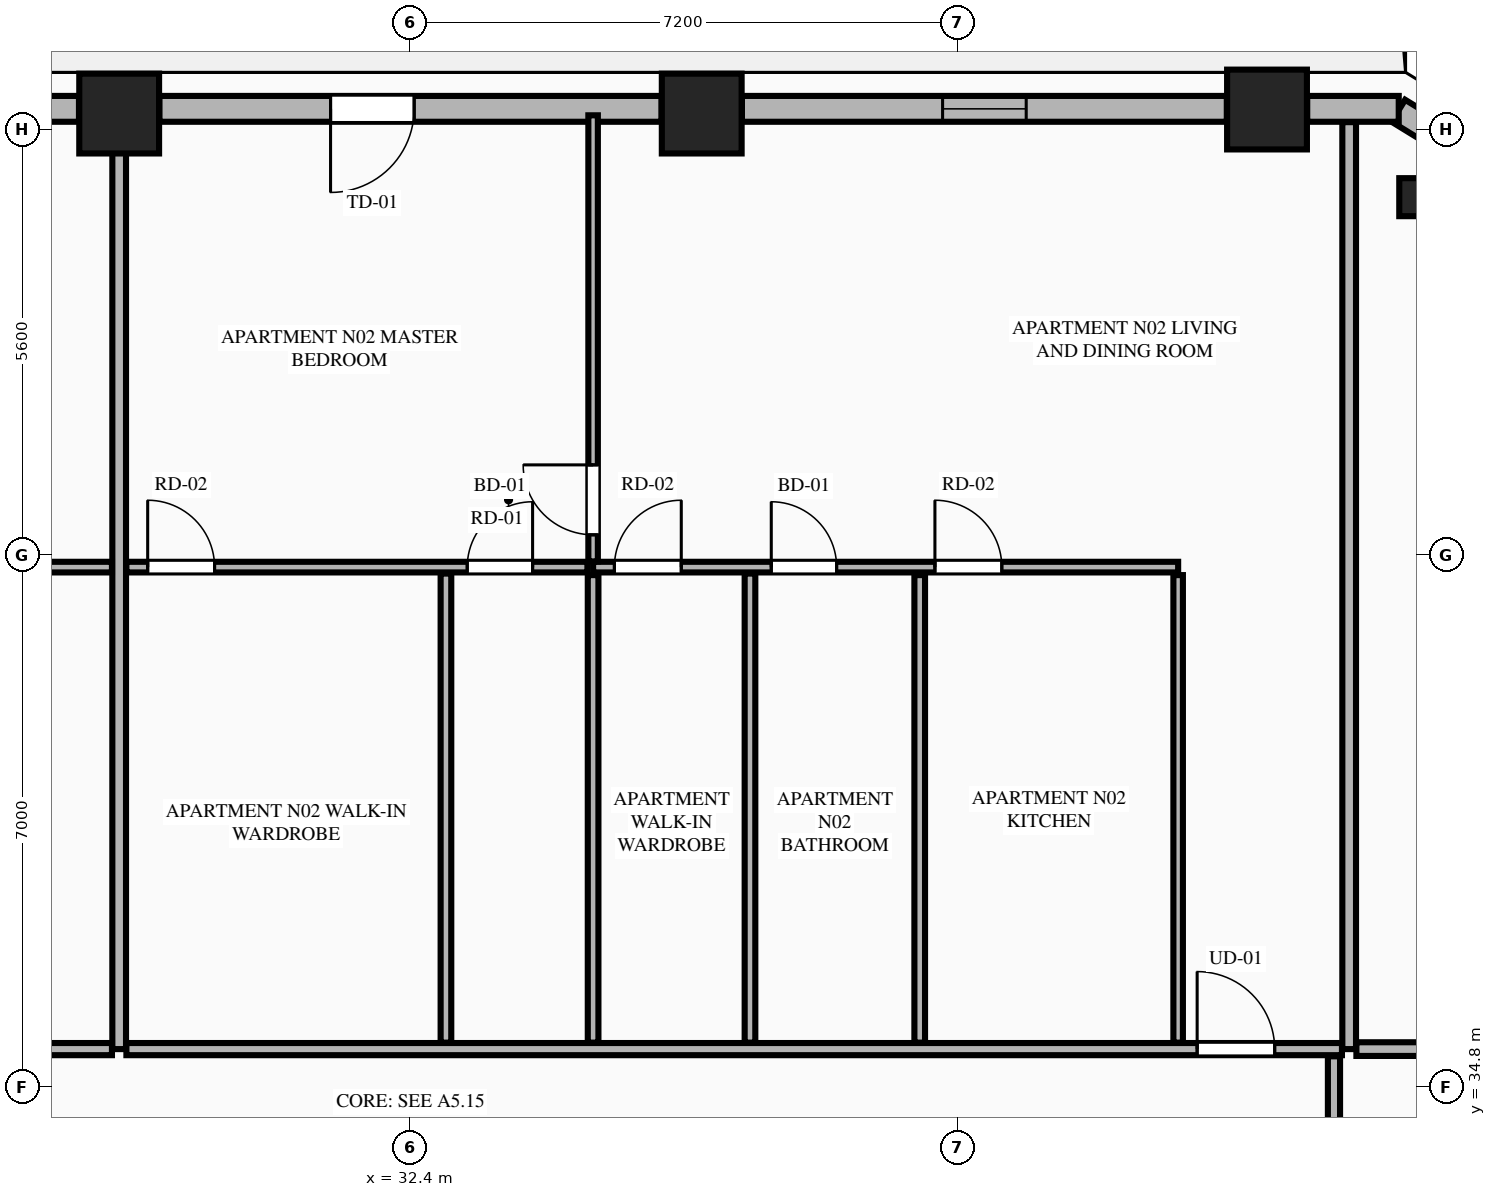
"""IFC4 building model, lengths in metres.
Left out: names, types, materials, properties, quantities, classifications, styles, units other than length and angle.
Written with IfcOpenShell. Run it as: python <this file> out.ifc"""

import sys

from ifc_helpers import new_model, si_unit, direction, frame, frame_2d, origin, origin_2d, place, context, subcontext, project, spatial, rectangle, extrude, element, fill, save


model = new_model("IFC4")
c1 = context("Model", 3, precision=1e-05, world=origin(), true_north=direction((0.0, 1.0)))
c2 = subcontext(c1, "Body", "Model", "MODEL_VIEW")
j1 = project(units=[si_unit("LENGTHUNIT", "METRE"), si_unit("PLANEANGLEUNIT", "RADIAN")], contexts=[c1])
p1 = place(None, origin())
s1 = spatial("IfcSite", under=j1, at=p1, CompositionType="ELEMENT")
p2 = place(p1, origin())
s2 = spatial("IfcBuilding", under=s1, at=p2, CompositionType="ELEMENT")
p3 = place(p2, frame((0.0, 0.0, 137.45)))
s3 = spatial("IfcBuildingStorey", under=s2, at=p3, CompositionType="ELEMENT", Elevation=137.45)
for number, where, z_axis, x_axis in (
    (1, (43.669, 47.661, 0.0), (0.0, 0.0, 1.0), (1.0, 0.0, 0.0)),
    (2, (36.232, 47.608, 0.0), (0.0, 0.0, 1.0), (1.0, 0.0, 0.0)),
    (3, (28.568, 47.608, 0.0), (0.0, 0.0, 1.0), (1.0, 0.0, 0.0)),
):
    element("IfcColumn", number, at=place(p3, frame(where, z_axis=z_axis, x_axis=x_axis)), inside=s3, PredefinedType="COLUMN", context=c2, shape_type="SweptSolid", body=[
        extrude(rectangle(XDim=1.05, YDim=1.05, at=origin_2d()), origin(), (0.0, 0.0, 1.0), 3.55),
    ])
p4 = place(p3, frame((45.659, 46.508, 0.0), z_axis=(0.0, 0.0, 1.0), x_axis=(-0.865160173452, 0.501495637342, 0.0)))
e4 = element("IfcColumn", 4, at=p4, inside=s3, PredefinedType="PILASTER", context=c2, shape_type="SweptSolid", body=[
    extrude(rectangle(XDim=0.5, YDim=0.35, at=origin_2d()), origin(), (0.0, 0.0, 1.0), 3.55),
])
p5 = place(p3, frame((46.971, 46.677, 0.0), z_axis=(0.0, 0.0, 1.0), x_axis=(-0.851798915137, 0.523868884523, 0.0)))
e5 = element("IfcWall", 5, at=p5, inside=s3, PredefinedType="STANDARD", context=c2, shape_type="SweptSolid", body=[
    extrude(rectangle(XDim=1.848, YDim=0.34, at=frame_2d((0.924, 0.0))), origin(), (0.0, 0.0, 1.0), 3.34),
])
p6 = place(p3, frame((45.402, 47.67, 0.0), z_axis=(0.0, 0.0, 1.0), x_axis=(-1.0, 0.0, 0.0)))
e6 = element("IfcWall", 6, at=p6, inside=s3, PredefinedType="STANDARD", context=c2, shape_type="SweptSolid", body=[
    extrude(rectangle(XDim=1.204, YDim=0.34, at=frame_2d((0.602, 0.0))), origin(), (0.0, 0.0, 1.0), 3.34),
])
p7 = place(p3, frame((43.14, 47.67, 0.0), z_axis=(0.0, 0.0, 1.0), x_axis=(-1.0, 0.0, 0.0)))
e7 = element("IfcWall", 7, at=p7, inside=s3, PredefinedType="STANDARD", context=c2, shape_type="SweptSolid", body=[
    extrude(rectangle(XDim=6.379, YDim=0.34, at=frame_2d((3.189, 0.0))), origin(), (0.0, 0.0, 1.0), 2.797),
])
p8 = place(p7, frame((2.639, 0.0, 0.75)))
e8 = element("IfcOpeningElement", 8, at=p8, cuts=e7, PredefinedType="OPENING", context=c2, shape_type="SweptSolid", body=[
    extrude(rectangle(XDim=1.1, YDim=1.897, at=frame_2d((0.55, 0.948))), frame((0.0, 0.18, 0.0), z_axis=(0.0, -1.0, 0.0), x_axis=(1.0, 0.0, 0.0)), (0.0, 0.0, 1.0), 0.36),
])
p9 = place(p3, frame((35.703, 47.67, 0.0), z_axis=(0.0, 0.0, 1.0), x_axis=(-1.0, 0.0, 0.0)))
e9 = element("IfcWall", 9, at=p9, inside=s3, PredefinedType="STANDARD", context=c2, shape_type="SweptSolid", body=[
    extrude(rectangle(XDim=6.606, YDim=0.34, at=frame_2d((3.303, 0.0))), origin(), (0.0, 0.0, 1.0), 2.797),
])
p10 = place(p9, frame((3.254, 0.0, 0.0)))
e10 = element("IfcOpeningElement", 10, at=p10, cuts=e9, PredefinedType="OPENING", context=c2, shape_type="SweptSolid", body=[
    extrude(rectangle(XDim=1.1, YDim=2.25, at=frame_2d((0.55, 1.125))), frame((0.0, 0.18, 0.0), z_axis=(0.0, -1.0, 0.0), x_axis=(1.0, 0.0, 0.0)), (0.0, 0.0, 1.0), 0.36),
])
p11 = place(p3, frame((28.039, 47.67, 0.0), z_axis=(0.0, 0.0, 1.0), x_axis=(-1.0, 0.0, 0.0)))
e11 = element("IfcWall", 11, at=p11, inside=s3, PredefinedType="STANDARD", context=c2, shape_type="SweptSolid", body=[
    extrude(rectangle(XDim=6.379, YDim=0.34, at=frame_2d((3.189, 0.0))), origin(), (0.0, 0.0, 1.0), 2.797),
])
p12 = place(p11, frame((2.64, 0.0, 0.75)))
e12 = element("IfcOpeningElement", 12, at=p12, cuts=e11, PredefinedType="OPENING", context=c2, shape_type="SweptSolid", body=[
    extrude(rectangle(XDim=1.1, YDim=1.897, at=frame_2d((0.55, 0.948))), frame((0.0, 0.18, 0.0), z_axis=(0.0, -1.0, 0.0), x_axis=(1.0, 0.0, 0.0)), (0.0, 0.0, 1.0), 0.36),
])
p13 = place(p3, frame((28.568, 35.3, 0.0), z_axis=(0.0, 0.0, 1.0), x_axis=(0.0, 1.0, 0.0)))
e13 = element("IfcWall", 13, at=p13, inside=s3, PredefinedType="PARTITIONING", context=c2, shape_type="SweptSolid", body=[
    extrude(rectangle(XDim=12.195, YDim=0.18, at=frame_2d((6.098, 0.0))), origin(), (0.0, 0.0, 1.0), 2.722),
])
p14 = place(p3, frame((44.75, 35.3, 0.0), z_axis=(0.0, 0.0, 1.0), x_axis=(0.0, 1.0, 0.0)))
e14 = element("IfcWall", 14, at=p14, inside=s3, PredefinedType="PARTITIONING", context=c2, shape_type="SweptSolid", body=[
    extrude(rectangle(XDim=12.195, YDim=0.18, at=frame_2d((6.098, 0.0))), origin(), (0.0, 0.0, 1.0), 3.34),
])
p15 = place(p3, frame((20.145, 35.3, 0.0), z_axis=(0.0, 0.0, 1.0), x_axis=(1.0, 0.0, 0.0)))
e15 = element("IfcWall", 15, at=p15, inside=s3, PredefinedType="PARTITIONING", context=c2, shape_type="SweptSolid", body=[
    extrude(rectangle(XDim=8.328, YDim=0.16, at=frame_2d((4.164, 0.0))), origin(), (0.0, 0.0, 1.0), 3.34),
])
p16 = place(p15, frame((0.405, 0.0, 0.0)))
e16 = element("IfcOpeningElement", 16, at=p16, cuts=e15, PredefinedType="OPENING", context=c2, shape_type="SweptSolid", body=[
    extrude(rectangle(XDim=1.02, YDim=2.25, at=frame_2d((0.51, 1.125))), frame((0.0, 0.09, 0.0), z_axis=(0.0, -1.0, 0.0), x_axis=(1.0, 0.0, 0.0)), (0.0, 0.0, 1.0), 0.18),
])
p17 = place(p3, frame((22.1, 41.641, 0.0), z_axis=(0.0, 0.0, 1.0), x_axis=(1.0, 0.0, 0.0)))
e17 = element("IfcWall", 17, at=p17, inside=s3, PredefinedType="PLUMBINGWALL", context=c2, shape_type="SweptSolid", body=[
    extrude(rectangle(XDim=6.373, YDim=0.14, at=frame_2d((3.187, 0.0))), origin(), (0.0, 0.0, 1.0), 3.34),
])
p18 = place(p17, frame((4.314, 0.0, 0.0)))
e18 = element("IfcOpeningElement", 18, at=p18, cuts=e17, PredefinedType="OPENING", context=c2, shape_type="SweptSolid", body=[
    extrude(rectangle(XDim=0.86, YDim=2.1, at=frame_2d((0.43, 1.05))), frame((0.0, 0.08, 0.0), z_axis=(0.0, -1.0, 0.0), x_axis=(1.0, 0.0, 0.0)), (0.0, 0.0, 1.0), 0.16),
])
p19 = place(p17, frame((0.22, 0.0, 0.0)))
e19 = element("IfcOpeningElement", 19, at=p19, cuts=e17, PredefinedType="OPENING", context=c2, shape_type="SweptSolid", body=[
    extrude(rectangle(XDim=0.88, YDim=2.15, at=frame_2d((0.44, 1.075))), frame((0.0, 0.08, 0.0), z_axis=(0.0, -1.0, 0.0), x_axis=(1.0, 0.0, 0.0)), (0.0, 0.0, 1.0), 0.16),
])
p20 = place(p3, frame((28.663, 35.3, 0.0), z_axis=(0.0, 0.0, 1.0), x_axis=(1.0, 0.0, 0.0)))
e20 = element("IfcWall", 20, at=p20, inside=s3, PredefinedType="PARTITIONING", context=c2, shape_type="SweptSolid", body=[
    extrude(rectangle(XDim=15.992, YDim=0.16, at=frame_2d((7.996, 0.0))), origin(), (0.0, 0.0, 1.0), 3.34),
])
p21 = place(p20, frame((14.087, 0.0, 0.0)))
e21 = element("IfcOpeningElement", 21, at=p21, cuts=e20, PredefinedType="OPENING", context=c2, shape_type="SweptSolid", body=[
    extrude(rectangle(XDim=1.02, YDim=2.25, at=frame_2d((0.51, 1.125))), frame((0.0, 0.09, 0.0), z_axis=(0.0, -1.0, 0.0), x_axis=(1.0, 0.0, 0.0)), (0.0, 0.0, 1.0), 0.18),
])
p22 = place(p3, frame((42.5, 35.385, 0.0), z_axis=(0.0, 0.0, 1.0), x_axis=(0.0, 1.0, 0.0)))
e22 = element("IfcWall", 22, at=p22, inside=s3, PredefinedType="PARTITIONING", context=c2, shape_type="SweptSolid", body=[
    extrude(rectangle(XDim=6.151, YDim=0.125, at=frame_2d((3.075, 0.0))), origin(), (0.0, 0.0, 1.0), 2.722),
])
p23 = place(p3, frame((34.803, 41.641, 0.0), z_axis=(0.0, 0.0, 1.0), x_axis=(1.0, 0.0, 0.0)))
e23 = element("IfcWall", 23, at=p23, inside=s3, PredefinedType="PLUMBINGWALL", context=c2, shape_type="SweptSolid", body=[
    extrude(rectangle(XDim=7.697, YDim=0.14, at=frame_2d((3.849, 0.0))), origin(), (0.0, 0.0, 1.0), 3.34),
])
p24 = place(p23, frame((0.28, 0.0, 0.0)))
e24 = element("IfcOpeningElement", 24, at=p24, cuts=e23, PredefinedType="OPENING", context=c2, shape_type="SweptSolid", body=[
    extrude(rectangle(XDim=0.88, YDim=2.15, at=frame_2d((0.44, 1.075))), frame((0.0, 0.08, 0.0), z_axis=(0.0, -1.0, 0.0), x_axis=(1.0, 0.0, 0.0)), (0.0, 0.0, 1.0), 0.16),
])
p25 = place(p23, frame((2.344, 0.0, 0.0)))
e25 = element("IfcOpeningElement", 25, at=p25, cuts=e23, PredefinedType="OPENING", context=c2, shape_type="SweptSolid", body=[
    extrude(rectangle(XDim=0.86, YDim=2.1, at=frame_2d((0.43, 1.05))), frame((0.0, 0.08, 0.0), z_axis=(0.0, -1.0, 0.0), x_axis=(1.0, 0.0, 0.0)), (0.0, 0.0, 1.0), 0.16),
])
p26 = place(p23, frame((4.497, 0.0, 0.0)))
e26 = element("IfcOpeningElement", 26, at=p26, cuts=e23, PredefinedType="OPENING", context=c2, shape_type="SweptSolid", body=[
    extrude(rectangle(XDim=0.88, YDim=2.15, at=frame_2d((0.44, 1.075))), frame((0.0, 0.08, 0.0), z_axis=(0.0, -1.0, 0.0), x_axis=(1.0, 0.0, 0.0)), (0.0, 0.0, 1.0), 0.16),
])
p27 = place(p3, frame((28.663, 41.641, 0.0), z_axis=(0.0, 0.0, 1.0), x_axis=(1.0, 0.0, 0.0)))
e27 = element("IfcWall", 27, at=p27, inside=s3, PredefinedType="PLUMBINGWALL", context=c2, shape_type="SweptSolid", body=[
    extrude(rectangle(XDim=6.065, YDim=0.14, at=frame_2d((3.032, 0.0))), origin(), (0.0, 0.0, 1.0), 3.34),
])
p28 = place(p27, frame((0.28, 0.0, 0.0)))
e28 = element("IfcOpeningElement", 28, at=p28, cuts=e27, PredefinedType="OPENING", context=c2, shape_type="SweptSolid", body=[
    extrude(rectangle(XDim=0.88, YDim=2.15, at=frame_2d((0.44, 1.075))), frame((0.0, 0.08, 0.0), z_axis=(0.0, -1.0, 0.0), x_axis=(1.0, 0.0, 0.0)), (0.0, 0.0, 1.0), 0.16),
])
p29 = place(p27, frame((4.484, 0.0, 0.0)))
e29 = element("IfcOpeningElement", 29, at=p29, cuts=e27, PredefinedType="OPENING", context=c2, shape_type="SweptSolid", body=[
    extrude(rectangle(XDim=0.86, YDim=2.1, at=frame_2d((0.43, 1.05))), frame((0.0, 0.08, 0.0), z_axis=(0.0, -1.0, 0.0), x_axis=(1.0, 0.0, 0.0)), (0.0, 0.0, 1.0), 0.16),
])
for number, where, z_axis, x_axis in (
    (30, (39.1, 35.385, 0.0), (0.0, 0.0, 1.0), (0.0, 1.0, 0.0)),
    (31, (34.803, 35.385, 0.0), (0.0, 0.0, 1.0), (0.0, 1.0, 0.0)),
):
    element("IfcWall", number, at=place(p3, frame(where, z_axis=z_axis, x_axis=x_axis)), inside=s3, PredefinedType="PLUMBINGWALL", context=c2, shape_type="SweptSolid", body=[
        extrude(rectangle(XDim=6.151, YDim=0.14, at=frame_2d((3.075, 0.0))), origin(), (0.0, 0.0, 1.0), 3.34),
    ])
p30 = place(p3, frame((34.803, 41.716, 0.0), z_axis=(0.0, 0.0, 1.0), x_axis=(0.0, 1.0, 0.0)))
e32 = element("IfcWall", 32, at=p30, inside=s3, PredefinedType="PARTITIONING", context=c2, shape_type="SweptSolid", body=[
    extrude(rectangle(XDim=5.869, YDim=0.125, at=frame_2d((2.935, 0.0))), origin(), (0.0, 0.0, 1.0), 3.34),
])
p31 = place(p30, frame((0.35, 0.0, 0.0)))
e33 = element("IfcOpeningElement", 33, at=p31, cuts=e32, PredefinedType="OPENING", context=c2, shape_type="SweptSolid", body=[
    extrude(rectangle(XDim=0.92, YDim=2.15, at=frame_2d((0.46, 1.075))), frame((0.0, 0.073, 0.0), z_axis=(0.0, -1.0, 0.0), x_axis=(1.0, 0.0, 0.0)), (0.0, 0.0, 1.0), 0.145),
])
for number, where, z_axis, x_axis in (
    (34, (36.867, 35.385, 0.0), (0.0, 0.0, 1.0), (0.0, 1.0, 0.0)),
    (35, (32.867, 35.385, 0.0), (0.0, 0.0, 1.0), (0.0, 1.0, 0.0)),
):
    element("IfcWall", number, at=place(p3, frame(where, z_axis=z_axis, x_axis=x_axis)), inside=s3, PredefinedType="PLUMBINGWALL", context=c2, shape_type="SweptSolid", body=[
        extrude(rectangle(XDim=6.171, YDim=0.14, at=frame_2d((3.085, 0.0))), origin(), (0.0, 0.0, 1.0), 3.34),
    ])
p32 = place(p3, frame((44.845, 35.3, 0.0), z_axis=(0.0, 0.0, 1.0), x_axis=(1.0, 0.0, 0.0)))
e36 = element("IfcWall", 36, at=p32, inside=s3, PredefinedType="PARTITIONING", context=c2, shape_type="SweptSolid", body=[
    extrude(rectangle(XDim=7.669, YDim=0.18, at=frame_2d((3.834, 0.0))), origin(), (0.0, 0.0, 1.0), 3.34),
])
p33 = place(p3, frame((44.55, 25.995, 0.0), z_axis=(0.0, 0.0, 1.0), x_axis=(0.0, 1.0, 0.0)))
e37 = element("IfcWall", 37, at=p33, inside=s3, PredefinedType="PARTITIONING", context=c2, shape_type="SweptSolid", body=[
    extrude(rectangle(XDim=9.21, YDim=0.16, at=frame_2d((4.605, 0.0))), origin(), (0.0, 0.0, 1.0), 3.34),
])
p34 = place(p33, frame((0.45, 0.0, 0.0)))
e38 = element("IfcOpeningElement", 38, at=p34, cuts=e37, PredefinedType="OPENING", context=c2, shape_type="SweptSolid", body=[
    extrude(rectangle(XDim=1.02, YDim=2.25, at=frame_2d((0.51, 1.125))), frame((0.0, 0.09, 0.0), z_axis=(0.0, -1.0, 0.0), x_axis=(1.0, 0.0, 0.0)), (0.0, 0.0, 1.0), 0.18),
])
p35 = place(p8, origin())
e39 = element("IfcWindow", 39, at=p35, inside=s3, PartitioningType="SINGLE_PANEL", PredefinedType="WINDOW", context=c2, shape_type="SweptSolid", body=[
    extrude(rectangle(XDim=1.1, YDim=1.897, at=frame_2d((0.55, 0.948))), frame((0.0, 0.03, 0.0), z_axis=(0.0, -1.0, 0.0), x_axis=(1.0, 0.0, 0.0)), (0.0, 0.0, 1.0), 0.06),
])
fill(e8, e39)
p36 = place(p10, origin())
e40 = element("IfcDoor", 40, at=p36, inside=s3, OperationType="SINGLE_SWING_RIGHT", PredefinedType="DOOR", context=c2, shape_type="SweptSolid", body=[
    extrude(rectangle(XDim=1.1, YDim=2.25, at=frame_2d((0.55, 1.125))), frame((0.0, 0.025, 0.0), z_axis=(0.0, -1.0, 0.0), x_axis=(1.0, 0.0, 0.0)), (0.0, 0.0, 1.0), 0.05),
])
fill(e10, e40)
p37 = place(p24, origin())
e41 = element("IfcDoor", 41, at=p37, inside=s3, OperationType="SINGLE_SWING_RIGHT", PredefinedType="DOOR", context=c2, shape_type="SweptSolid", body=[
    extrude(rectangle(XDim=0.88, YDim=2.15, at=frame_2d((0.44, 1.075))), frame((0.0, 0.025, 0.0), z_axis=(0.0, -1.0, 0.0), x_axis=(1.0, 0.0, 0.0)), (0.0, 0.0, 1.0), 0.05),
])
fill(e24, e41)
p38 = place(p25, origin())
e42 = element("IfcDoor", 42, at=p38, inside=s3, OperationType="SINGLE_SWING_LEFT", PredefinedType="DOOR", context=c2, shape_type="SweptSolid", body=[
    extrude(rectangle(XDim=0.86, YDim=2.1, at=frame_2d((0.43, 1.05))), frame((0.0, 0.025, 0.0), z_axis=(0.0, -1.0, 0.0), x_axis=(1.0, 0.0, 0.0)), (0.0, 0.0, 1.0), 0.05),
])
fill(e25, e42)
p39 = place(p28, origin())
e43 = element("IfcDoor", 43, at=p39, inside=s3, OperationType="SINGLE_SWING_LEFT", PredefinedType="DOOR", context=c2, shape_type="SweptSolid", body=[
    extrude(rectangle(XDim=0.88, YDim=2.15, at=frame_2d((0.44, 1.075))), frame((0.0, 0.025, 0.0), z_axis=(0.0, -1.0, 0.0), x_axis=(1.0, 0.0, 0.0)), (0.0, 0.0, 1.0), 0.05),
])
fill(e28, e43)
p40 = place(p29, origin())
e44 = element("IfcDoor", 44, at=p40, inside=s3, OperationType="SINGLE_SWING_RIGHT", PredefinedType="DOOR", context=c2, shape_type="SweptSolid", body=[
    extrude(rectangle(XDim=0.86, YDim=2.1, at=frame_2d((0.43, 1.05))), frame((0.0, 0.025, 0.0), z_axis=(0.0, -1.0, 0.0), x_axis=(1.0, 0.0, 0.0)), (0.0, 0.0, 1.0), 0.05),
])
fill(e29, e44)
p41 = place(p21, origin())
e45 = element("IfcDoor", 45, at=p41, inside=s3, OperationType="SINGLE_SWING_LEFT", PredefinedType="DOOR", context=c2, shape_type="SweptSolid", body=[
    extrude(rectangle(XDim=1.02, YDim=2.25, at=frame_2d((0.51, 1.125))), frame((0.0, 0.025, 0.0), z_axis=(0.0, -1.0, 0.0), x_axis=(1.0, 0.0, 0.0)), (0.0, 0.0, 1.0), 0.05),
])
fill(e21, e45)
p42 = place(p26, origin())
e46 = element("IfcDoor", 46, at=p42, inside=s3, OperationType="SINGLE_SWING_LEFT", PredefinedType="DOOR", context=c2, shape_type="SweptSolid", body=[
    extrude(rectangle(XDim=0.88, YDim=2.15, at=frame_2d((0.44, 1.075))), frame((0.0, 0.025, 0.0), z_axis=(0.0, -1.0, 0.0), x_axis=(1.0, 0.0, 0.0)), (0.0, 0.0, 1.0), 0.05),
])
fill(e26, e46)
p43 = place(p31, origin())
e47 = element("IfcDoor", 47, at=p43, inside=s3, OperationType="SINGLE_SWING_RIGHT", PredefinedType="DOOR", context=c2, shape_type="SweptSolid", body=[
    extrude(rectangle(XDim=0.92, YDim=2.15, at=frame_2d((0.46, 1.075))), frame((0.0, 0.025, 0.0), z_axis=(0.0, -1.0, 0.0), x_axis=(1.0, 0.0, 0.0)), (0.0, 0.0, 1.0), 0.05),
])
fill(e33, e47)
save(model, sys.argv[1])
